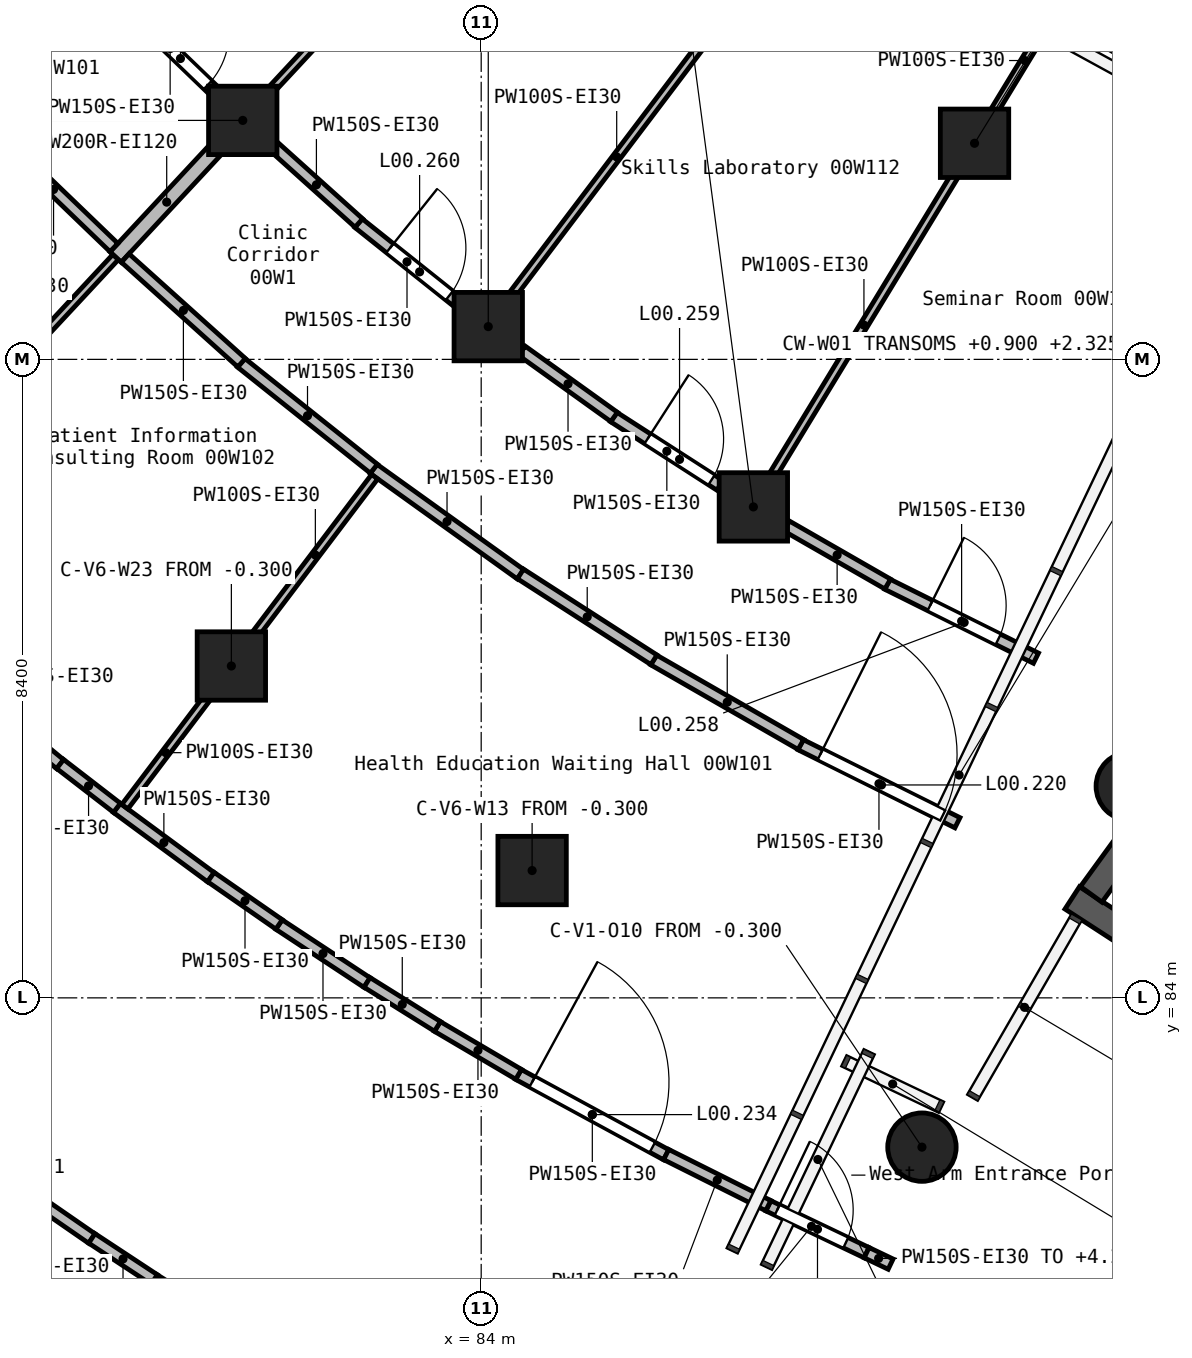
"""IFC4 building model, lengths in metres.
Left out: names, types, materials, properties, quantities, classifications, styles, units other than length and angle.
Written with IfcOpenShell. Run it as: python <this file> out.ifc"""

import sys

from ifc_helpers import new_model, si_unit, direction, frame, frame_2d, origin, origin_2d, place, context, subcontext, project, spatial, rectangle, circle, extrude, element, fill, save


model = new_model("IFC4")
c1 = context("Model", 3, precision=1e-05, world=origin(), true_north=direction((0.0, 1.0)))
c2 = subcontext(c1, "Body", "Model", "MODEL_VIEW")
j1 = project(units=[si_unit("LENGTHUNIT", "METRE"), si_unit("PLANEANGLEUNIT", "RADIAN")], contexts=[c1])
p1 = place(None, origin())
s1 = spatial("IfcSite", under=j1, at=p1, CompositionType="ELEMENT")
p2 = place(p1, origin())
s2 = spatial("IfcBuilding", under=s1, at=p2, CompositionType="ELEMENT")
p3 = place(p2, origin())
s3 = spatial("IfcBuildingStorey", under=s2, at=p3, CompositionType="ELEMENT", Elevation=0.0)
for number, where, z_axis, x_axis in (
    (1, (80.713, 88.366, -0.3), (0.0, 0.0, 1.0), (1.0, 0.0, 0.0)),
    (2, (80.863, 95.544, -0.3), (0.0, 0.0, 1.0), (1.0, 0.0, 0.0)),
    (3, (84.093, 92.831, -0.3), (0.0, 0.0, 1.0), (1.0, 0.0, 0.0)),
    (4, (84.67, 85.675, -0.3), (0.0, 0.0, 1.0), (1.0, 0.0, 0.0)),
    (5, (87.581, 90.459, -0.3), (0.0, 0.0, 1.0), (1.0, 0.0, 0.0)),
):
    element("IfcColumn", number, at=place(p3, frame(where, z_axis=z_axis, x_axis=x_axis)), inside=s3, PredefinedType="COLUMN", context=c2, shape_type="SweptSolid", body=[
        extrude(rectangle(XDim=0.9, YDim=0.9, at=origin_2d()), origin(), (0.0, 0.0, 1.0), 5.7),
    ])
p4 = place(p3, frame((89.799, 82.036, -0.3), z_axis=(0.0, 0.0, 1.0), x_axis=(1.0, 0.0, 0.0)))
e6 = element("IfcColumn", 6, at=p4, inside=s3, PredefinedType="COLUMN", context=c2, shape_type="SweptSolid", body=[
    extrude(circle(Radius=0.45, at=origin_2d()), origin(), (0.0, 0.0, 1.0), 5.7),
])
p5 = place(p3, frame((90.491, 95.243, -0.3), z_axis=(0.0, 0.0, 1.0), x_axis=(1.0, 0.0, 0.0)))
e7 = element("IfcColumn", 7, at=p5, inside=s3, PredefinedType="COLUMN", context=c2, shape_type="SweptSolid", body=[
    extrude(rectangle(XDim=0.9, YDim=0.9, at=origin_2d()), origin(), (0.0, 0.0, 1.0), 5.7),
])
p6 = place(p3, frame((92.54, 86.784, -0.3), z_axis=(0.0, 0.0, 1.0), x_axis=(1.0, 0.0, 0.0)))
e8 = element("IfcColumn", 8, at=p6, inside=s3, PredefinedType="COLUMN", context=c2, shape_type="SweptSolid", body=[
    extrude(circle(Radius=0.45, at=origin_2d()), origin(), (0.0, 0.0, 1.0), 5.7),
])
p7 = place(p3, frame((91.776, 85.315, -0.3), z_axis=(0.0, 0.0, 1.0), x_axis=(0.838710342359, -0.544577782893, 0.0)))
e9 = element("IfcWall", 9, at=p7, inside=s3, PredefinedType="SHEAR", context=c2, shape_type="SweptSolid", body=[
    extrude(rectangle(XDim=3.951, YDim=0.35, at=frame_2d((1.976, 0.0))), origin(), (0.0, 0.0, 1.0), 5.7),
])
p8 = place(p3, frame((93.187, 86.958, -0.3), z_axis=(0.0, 0.0, 1.0), x_axis=(-0.588083467619, -0.808800244259, 0.0)))
e10 = element("IfcWall", 10, at=p8, inside=s3, PredefinedType="SHEAR", context=c2, shape_type="SweptSolid", body=[
    extrude(rectangle(XDim=1.974, YDim=0.35, at=frame_2d((0.987, 0.0))), origin(), (0.0, 0.0, 1.0), 5.7),
])
p9 = place(p3, frame((79.19, 93.746, 0.0), z_axis=(0.0, 0.0, 1.0), x_axis=(0.681171780306, 0.732123627344, 0.0)))
e11 = element("IfcWall", 11, at=p9, inside=s3, PredefinedType="SOLIDWALL", context=c2, shape_type="SweptSolid", body=[
    extrude(rectangle(XDim=1.974, YDim=0.2, at=frame_2d((0.987, 0.0))), origin(), (0.0, 0.0, 1.0), 5.05),
])
p10 = place(p3, frame((88.201, 87.331, 0.0), z_axis=(0.0, 0.0, 1.0), x_axis=(0.895335597875, -0.445392149883, 0.0)))
e12 = element("IfcWall", 12, at=p10, inside=s3, PredefinedType="PARTITIONING", context=c2, shape_type="SweptSolid", body=[
    extrude(rectangle(XDim=2.307, YDim=0.15, at=frame_2d((1.153, 0.0))), origin(), (0.0, 0.0, 1.0), 5.05),
])
p11 = place(p10, frame((0.291, 0.0, 0.0)))
e13 = element("IfcOpeningElement", 13, at=p11, cuts=e12, PredefinedType="OPENING", context=c2, shape_type="SweptSolid", body=[
    extrude(rectangle(XDim=1.8, YDim=2.1, at=frame_2d((0.9, 1.05))), frame((0.0, 0.085, 0.0), z_axis=(0.0, -1.0, 0.0), x_axis=(1.0, 0.0, 0.0)), (0.0, 0.0, 1.0), 0.17),
])
p12 = place(p3, frame((82.583, 90.961, 0.0), z_axis=(0.0, 0.0, 1.0), x_axis=(0.812456963848, -0.583021167622, 0.0)))
e14 = element("IfcWall", 14, at=p12, inside=s3, PredefinedType="PARTITIONING", context=c2, shape_type="SweptSolid", body=[
    extrude(rectangle(XDim=2.381, YDim=0.15, at=frame_2d((1.191, 0.0))), origin(), (0.0, 0.0, 1.0), 5.05),
])
p13 = place(p3, frame((80.841, 92.356, 0.0), z_axis=(0.0, 0.0, 1.0), x_axis=(0.781561025488, -0.62382879337, 0.0)))
e15 = element("IfcWall", 15, at=p13, inside=s3, PredefinedType="PARTITIONING", context=c2, shape_type="SweptSolid", body=[
    extrude(rectangle(XDim=2.235, YDim=0.15, at=frame_2d((1.118, 0.0))), origin(), (0.0, 0.0, 1.0), 5.05),
])
p14 = place(p3, frame((77.579, 95.4, 0.0), z_axis=(0.0, 0.0, 1.0), x_axis=(0.720594722174, -0.693356507415, 0.0)))
e16 = element("IfcWall", 16, at=p14, inside=s3, PredefinedType="PARTITIONING", context=c2, shape_type="SweptSolid", body=[
    extrude(rectangle(XDim=2.205, YDim=0.15, at=frame_2d((1.103, 0.0))), origin(), (0.0, 0.0, 1.0), 5.05),
])
p15 = place(p3, frame((86.268, 88.446, 0.0), z_axis=(0.0, 0.0, 1.0), x_axis=(0.867212921502, -0.497937494852, 0.0)))
e17 = element("IfcWall", 17, at=p15, inside=s3, PredefinedType="PARTITIONING", context=c2, shape_type="SweptSolid", body=[
    extrude(rectangle(XDim=2.235, YDim=0.15, at=frame_2d((1.118, 0.0))), origin(), (0.0, 0.0, 1.0), 5.05),
])
p16 = place(p3, frame((79.316, 93.733, 0.0), z_axis=(0.0, 0.0, 1.0), x_axis=(0.74346507851, -0.668774758073, 0.0)))
e18 = element("IfcWall", 18, at=p16, inside=s3, PredefinedType="PARTITIONING", context=c2, shape_type="SweptSolid", body=[
    extrude(rectangle(XDim=2.059, YDim=0.15, at=frame_2d((1.03, 0.0))), origin(), (0.0, 0.0, 1.0), 5.05),
])
p17 = place(p3, frame((84.517, 89.577, 0.0), z_axis=(0.0, 0.0, 1.0), x_axis=(0.840935250807, -0.541135753717, 0.0)))
e19 = element("IfcWall", 19, at=p17, inside=s3, PredefinedType="PARTITIONING", context=c2, shape_type="SweptSolid", body=[
    extrude(rectangle(XDim=2.088, YDim=0.15, at=frame_2d((1.044, 0.0))), origin(), (0.0, 0.0, 1.0), 5.05),
])
p18 = place(p3, frame((82.385, 94.194, 0.0), z_axis=(0.0, 0.0, 1.0), x_axis=(0.781756052881, -0.623584375833, 0.0)))
e20 = element("IfcWall", 20, at=p18, inside=s3, PredefinedType="PARTITIONING", context=c2, shape_type="SweptSolid", body=[
    extrude(rectangle(XDim=1.636, YDim=0.15, at=frame_2d((0.818, 0.0))), origin(), (0.0, 0.0, 1.0), 5.05),
])
p19 = place(p18, frame((0.53, 0.0, 0.0)))
e21 = element("IfcOpeningElement", 21, at=p19, cuts=e20, PredefinedType="OPENING", context=c2, shape_type="SweptSolid", body=[
    extrude(rectangle(XDim=1.0, YDim=2.1, at=frame_2d((0.5, 1.05))), frame((0.0, 0.085, 0.0), z_axis=(0.0, -1.0, 0.0), x_axis=(1.0, 0.0, 0.0)), (0.0, 0.0, 1.0), 0.17),
])
p20 = place(p3, frame((89.343, 89.442, 0.0), z_axis=(0.0, 0.0, 1.0), x_axis=(0.895274815557, -0.445514314731, 0.0)))
e22 = element("IfcWall", 22, at=p20, inside=s3, PredefinedType="PARTITIONING", context=c2, shape_type="SweptSolid", body=[
    extrude(rectangle(XDim=2.185, YDim=0.15, at=frame_2d((1.092, 0.0))), origin(), (0.0, 0.0, 1.0), 5.05),
])
p21 = place(p20, frame((0.63, 0.0, 0.0)))
e23 = element("IfcOpeningElement", 23, at=p21, cuts=e22, PredefinedType="OPENING", context=c2, shape_type="SweptSolid", body=[
    extrude(rectangle(XDim=1.0, YDim=2.1, at=frame_2d((0.5, 1.05))), frame((0.0, 0.085, 0.0), z_axis=(0.0, -1.0, 0.0), x_axis=(1.0, 0.0, 0.0)), (0.0, 0.0, 1.0), 0.17),
])
p22 = place(p3, frame((85.744, 91.642, 0.0), z_axis=(0.0, 0.0, 1.0), x_axis=(0.840848932624, -0.54126987031, 0.0)))
e24 = element("IfcWall", 24, at=p22, inside=s3, PredefinedType="PARTITIONING", context=c2, shape_type="SweptSolid", body=[
    extrude(rectangle(XDim=1.662, YDim=0.15, at=frame_2d((0.831, 0.0))), origin(), (0.0, 0.0, 1.0), 5.05),
])
p23 = place(p22, frame((0.53, 0.0, 0.0)))
e25 = element("IfcOpeningElement", 25, at=p23, cuts=e24, PredefinedType="OPENING", context=c2, shape_type="SweptSolid", body=[
    extrude(rectangle(XDim=1.0, YDim=2.1, at=frame_2d((0.5, 1.05))), frame((0.0, 0.085, 0.0), z_axis=(0.0, -1.0, 0.0), x_axis=(1.0, 0.0, 0.0)), (0.0, 0.0, 1.0), 0.17),
])
p24 = place(p3, frame((79.301, 97.072, 0.0), z_axis=(0.0, 0.0, 1.0), x_axis=(0.720465115712, -0.69349118022, 0.0)))
e26 = element("IfcWall", 26, at=p24, inside=s3, PredefinedType="PARTITIONING", context=c2, shape_type="SweptSolid", body=[
    extrude(rectangle(XDim=1.684, YDim=0.15, at=frame_2d((0.842, 0.0))), origin(), (0.0, 0.0, 1.0), 5.05),
])
p25 = place(p24, frame((0.53, 0.0, 0.0)))
e27 = element("IfcOpeningElement", 27, at=p25, cuts=e26, PredefinedType="OPENING", context=c2, shape_type="SweptSolid", body=[
    extrude(rectangle(XDim=1.0, YDim=2.1, at=frame_2d((0.5, 1.05))), frame((0.0, 0.085, 0.0), z_axis=(0.0, -1.0, 0.0), x_axis=(1.0, 0.0, 0.0)), (0.0, 0.0, 1.0), 0.17),
])
p26 = place(p3, frame((84.536, 92.513, 0.0), z_axis=(0.0, 0.0, 1.0), x_axis=(0.81243891359, -0.583046320359, 0.0)))
e28 = element("IfcWall", 28, at=p26, inside=s3, PredefinedType="PARTITIONING", context=c2, shape_type="SweptSolid", body=[
    extrude(rectangle(XDim=1.493, YDim=0.15, at=frame_2d((0.747, 0.0))), origin(), (0.0, 0.0, 1.0), 5.05),
])
p27 = place(p3, frame((88.018, 90.208, 0.0), z_axis=(0.0, 0.0, 1.0), x_axis=(0.867174234795, -0.498004865947, 0.0)))
e29 = element("IfcWall", 29, at=p27, inside=s3, PredefinedType="PARTITIONING", context=c2, shape_type="SweptSolid", body=[
    extrude(rectangle(XDim=1.535, YDim=0.15, at=frame_2d((0.768, 0.0))), origin(), (0.0, 0.0, 1.0), 5.05),
])
p28 = place(p3, frame((81.273, 95.199, 0.0), z_axis=(0.0, 0.0, 1.0), x_axis=(0.743576936712, -0.668650386368, 0.0)))
e30 = element("IfcWall", 30, at=p28, inside=s3, PredefinedType="PARTITIONING", context=c2, shape_type="SweptSolid", body=[
    extrude(rectangle(XDim=1.502, YDim=0.15, at=frame_2d((0.751, 0.0))), origin(), (0.0, 0.0, 1.0), 5.05),
])
p29 = place(p3, frame((84.489, 82.993, 0.0), z_axis=(0.0, 0.0, 1.0), x_axis=(0.878602388498, -0.47755402095, 0.0)))
e31 = element("IfcWall", 31, at=p29, inside=s3, PredefinedType="PARTITIONING", context=c2, shape_type="SweptSolid", body=[
    extrude(rectangle(XDim=2.215, YDim=0.15, at=frame_2d((1.107, 0.0))), origin(), (0.0, 0.0, 1.0), 5.05),
])
p30 = place(p29, frame((0.207, 0.0, 0.0)))
e32 = element("IfcOpeningElement", 32, at=p30, cuts=e31, PredefinedType="OPENING", context=c2, shape_type="SweptSolid", body=[
    extrude(rectangle(XDim=1.8, YDim=2.1, at=frame_2d((0.9, 1.05))), frame((0.0, 0.085, 0.0), z_axis=(0.0, -1.0, 0.0), x_axis=(1.0, 0.0, 0.0)), (0.0, 0.0, 1.0), 0.17),
])
p31 = place(p3, frame((77.051, 88.236, 0.0), z_axis=(0.0, 0.0, 1.0), x_axis=(0.771517511576, -0.636208086502, 0.0)))
e33 = element("IfcWall", 33, at=p31, inside=s3, PredefinedType="PARTITIONING", context=c2, shape_type="SweptSolid", body=[
    extrude(rectangle(XDim=1.828, YDim=0.15, at=frame_2d((0.914, 0.0))), origin(), (0.0, 0.0, 1.0), 5.05),
])
p32 = place(p3, frame((87.778, 81.264, 0.0), z_axis=(0.0, 0.0, 1.0), x_axis=(0.902557824877, -0.430568662066, 0.0)))
e34 = element("IfcWall", 34, at=p32, inside=s3, PredefinedType="PARTITIONING", context=c2, shape_type="SweptSolid", body=[
    extrude(rectangle(XDim=1.432, YDim=0.15, at=frame_2d((0.716, 0.0))), origin(), (0.0, 0.0, 1.0), 5.05),
])
p33 = place(p32, frame((0.129, 0.0, 0.0)))
e35 = element("IfcOpeningElement", 35, at=p33, cuts=e34, PredefinedType="OPENING", context=c2, shape_type="SweptSolid", body=[
    extrude(rectangle(XDim=1.0, YDim=2.1, at=frame_2d((0.5, 1.05))), frame((0.0, 0.085, 0.0), z_axis=(0.0, -1.0, 0.0), x_axis=(1.0, 0.0, 0.0)), (0.0, 0.0, 1.0), 0.17),
])
p34 = place(p3, frame((89.071, 80.648, 0.0), z_axis=(0.0, 0.0, 1.0), x_axis=(0.902641205527, -0.43039383602, 0.0)))
e36 = element("IfcWall", 36, at=p34, inside=s3, PredefinedType="PARTITIONING", context=c2, shape_type="SweptSolid", body=[
    extrude(rectangle(XDim=0.35, YDim=0.15, at=frame_2d((0.175, 0.0))), origin(), (0.0, 0.0, 1.0), 4.28),
])
p35 = place(p3, frame((86.434, 81.938, 0.0), z_axis=(0.0, 0.0, 1.0), x_axis=(0.894297168166, -0.447473546717, 0.0)))
e37 = element("IfcWall", 37, at=p35, inside=s3, PredefinedType="PARTITIONING", context=c2, shape_type="SweptSolid", body=[
    extrude(rectangle(XDim=1.503, YDim=0.15, at=frame_2d((0.751, 0.0))), origin(), (0.0, 0.0, 1.0), 5.05),
])
p36 = place(p3, frame((79.206, 86.5, 0.0), z_axis=(0.0, 0.0, 1.0), x_axis=(0.804960127747, -0.593328907721, 0.0)))
e38 = element("IfcWall", 38, at=p36, inside=s3, PredefinedType="PARTITIONING", context=c2, shape_type="SweptSolid", body=[
    extrude(rectangle(XDim=1.539, YDim=0.15, at=frame_2d((0.77, 0.0))), origin(), (0.0, 0.0, 1.0), 5.05),
])
p37 = place(p3, frame((79.695, 80.295, 0.0), z_axis=(0.0, 0.0, 1.0), x_axis=(0.847541618724, -0.530728936964, 0.0)))
e39 = element("IfcWall", 39, at=p37, inside=s3, PredefinedType="PARTITIONING", context=c2, shape_type="SweptSolid", body=[
    extrude(rectangle(XDim=1.353, YDim=0.15, at=frame_2d((0.676, 0.0))), origin(), (0.0, 0.0, 1.0), 5.05),
])
p38 = place(p3, frame((77.653, 81.68, 0.0), z_axis=(0.0, 0.0, 1.0), x_axis=(0.822646640465, -0.568552992194, 0.0)))
e40 = element("IfcWall", 40, at=p38, inside=s3, PredefinedType="PARTITIONING", context=c2, shape_type="SweptSolid", body=[
    extrude(rectangle(XDim=1.488, YDim=0.15, at=frame_2d((0.744, 0.0))), origin(), (0.0, 0.0, 1.0), 5.05),
])
p39 = place(p3, frame((81.338, 84.965, 0.0), z_axis=(0.0, 0.0, 1.0), x_axis=(0.834958204617, -0.550313362134, 0.0)))
e41 = element("IfcWall", 41, at=p39, inside=s3, PredefinedType="PARTITIONING", context=c2, shape_type="SweptSolid", body=[
    extrude(rectangle(XDim=1.389, YDim=0.15, at=frame_2d((0.695, 0.0))), origin(), (0.0, 0.0, 1.0), 5.05),
])
p40 = place(p3, frame((83.422, 83.624, 0.0), z_axis=(0.0, 0.0, 1.0), x_axis=(0.861696583626, -0.507423883718, 0.0)))
e42 = element("IfcWall", 42, at=p40, inside=s3, PredefinedType="PARTITIONING", context=c2, shape_type="SweptSolid", body=[
    extrude(rectangle(XDim=1.242, YDim=0.15, at=frame_2d((0.621, 0.0))), origin(), (0.0, 0.0, 1.0), 5.05),
])
for number, where, z_axis, x_axis in (
    (43, (82.498, 84.203, 0.0), (0.0, 0.0, 1.0), (0.848, -0.529, 0.0)),
    (44, (80.444, 85.589, 0.0), (0.0, 0.0, 1.0), (0.821, -0.571, 0.0)),
):
    element("IfcWall", number, at=place(p3, frame(where, z_axis=z_axis, x_axis=x_axis)), inside=s3, PredefinedType="PARTITIONING", context=c2, shape_type="SweptSolid", body=[
        extrude(rectangle(XDim=1.093, YDim=0.15, at=frame_2d((0.546, 0.0))), origin(), (0.0, 0.0, 1.0), 5.05),
    ])
p41 = place(p3, frame((78.877, 80.836, 0.0), z_axis=(0.0, 0.0, 1.0), x_axis=(0.835209839134, -0.549931381733, 0.0)))
e45 = element("IfcWall", 45, at=p41, inside=s3, PredefinedType="PARTITIONING", context=c2, shape_type="SweptSolid", body=[
    extrude(rectangle(XDim=0.982, YDim=0.15, at=frame_2d((0.491, 0.0))), origin(), (0.0, 0.0, 1.0), 5.05),
])
p42 = place(p3, frame((78.46, 87.077, 0.0), z_axis=(0.0, 0.0, 1.0), x_axis=(0.791671493317, -0.610947008069, 0.0)))
e46 = element("IfcWall", 46, at=p42, inside=s3, PredefinedType="PARTITIONING", context=c2, shape_type="SweptSolid", body=[
    extrude(rectangle(XDim=0.944, YDim=0.15, at=frame_2d((0.472, 0.0))), origin(), (0.0, 0.0, 1.0), 5.05),
])
p43 = place(p3, frame((84.418, 93.26, 0.0), z_axis=(0.0, 0.0, 1.0), x_axis=(0.603501117064, 0.797362152163, 0.0)))
e47 = element("IfcWall", 47, at=p43, inside=s3, PredefinedType="PARTITIONING", context=c2, shape_type="SweptSolid", body=[
    extrude(rectangle(XDim=4.522, YDim=0.1, at=frame_2d((2.261, 0.0))), origin(), (0.0, 0.0, 1.0), 5.05),
])
p44 = place(p3, frame((87.84, 90.885, 0.0), z_axis=(0.0, 0.0, 1.0), x_axis=(0.519618801015, 0.854398210223, 0.0)))
e48 = element("IfcWall", 48, at=p44, inside=s3, PredefinedType="PARTITIONING", context=c2, shape_type="SweptSolid", body=[
    extrude(rectangle(XDim=4.603, YDim=0.1, at=frame_2d((2.302, 0.0))), origin(), (0.0, 0.0, 1.0), 5.05),
])
p45 = place(p3, frame((90.75, 95.668, 0.0), z_axis=(0.0, 0.0, 1.0), x_axis=(0.519552672181, 0.854438424247, 0.0)))
e49 = element("IfcWall", 49, at=p45, inside=s3, PredefinedType="PARTITIONING", context=c2, shape_type="SweptSolid", body=[
    extrude(rectangle(XDim=1.552, YDim=0.1, at=frame_2d((0.776, 0.0))), origin(), (0.0, 0.0, 1.0), 5.05),
])
p46 = place(p3, frame((81.227, 95.935, 0.0), z_axis=(0.0, 0.0, 1.0), x_axis=(0.681211440492, 0.732086725288, 0.0)))
e50 = element("IfcWall", 50, at=p46, inside=s3, PredefinedType="PARTITIONING", context=c2, shape_type="SweptSolid", body=[
    extrude(rectangle(XDim=4.53, YDim=0.1, at=frame_2d((2.265, 0.0))), origin(), (0.0, 0.0, 1.0), 5.05),
])
p47 = place(p3, frame((77.412, 91.835, 0.0), z_axis=(0.0, 0.0, 1.0), x_axis=(0.681147107729, 0.732146582067, 0.0)))
e51 = element("IfcWall", 51, at=p47, inside=s3, PredefinedType="PARTITIONING", context=c2, shape_type="SweptSolid", body=[
    extrude(rectangle(XDim=2.609, YDim=0.1, at=frame_2d((1.304, 0.0))), origin(), (0.0, 0.0, 1.0), 5.05),
])
p48 = place(p3, frame((79.312, 86.515, 0.0), z_axis=(0.0, 0.0, 1.0), x_axis=(0.603588624137, 0.797295912954, 0.0)))
e52 = element("IfcWall", 52, at=p48, inside=s3, PredefinedType="PARTITIONING", context=c2, shape_type="SweptSolid", body=[
    extrude(rectangle(XDim=1.782, YDim=0.1, at=frame_2d((0.891, 0.0))), origin(), (0.0, 0.0, 1.0), 5.05),
])
p49 = place(p3, frame((81.038, 88.796, 0.0), z_axis=(0.0, 0.0, 1.0), x_axis=(0.603561177332, 0.797316690668, 0.0)))
e53 = element("IfcWall", 53, at=p49, inside=s3, PredefinedType="PARTITIONING", context=c2, shape_type="SweptSolid", body=[
    extrude(rectangle(XDim=2.584, YDim=0.1, at=frame_2d((1.292, 0.0))), origin(), (0.0, 0.0, 1.0), 5.05),
])
p50 = place(p3, frame((91.572, 96.928, 0.0), z_axis=(0.0, 0.0, 1.0), x_axis=(0.867607434085, -0.497249776591, 0.0)))
e54 = element("IfcWall", 54, at=p50, inside=s3, PredefinedType="PARTITIONING", context=c2, shape_type="SweptSolid", body=[
    extrude(rectangle(XDim=1.751, YDim=0.1, at=frame_2d((0.875, 0.0))), origin(), (0.0, 0.0, 1.0), 5.05),
])
p51 = place(p11, origin())
e55 = element("IfcDoor", 55, at=p51, inside=s3, OperationType="DOUBLE_DOOR_SINGLE_SWING", PredefinedType="DOOR", context=c2, shape_type="SweptSolid", body=[
    extrude(rectangle(XDim=1.8, YDim=2.1, at=frame_2d((0.9, 1.05))), frame((0.0, 0.025, 0.0), z_axis=(0.0, -1.0, 0.0), x_axis=(1.0, 0.0, 0.0)), (0.0, 0.0, 1.0), 0.05),
])
fill(e13, e55)
p52 = place(p30, frame((1.8, 0.0, 0.0), z_axis=(0.0, 0.0, 1.0), x_axis=(-1.0, 0.0, 0.0)))
e56 = element("IfcDoor", 56, at=p52, inside=s3, OperationType="DOUBLE_DOOR_SINGLE_SWING", PredefinedType="DOOR", context=c2, shape_type="SweptSolid", body=[
    extrude(rectangle(XDim=1.8, YDim=2.1, at=frame_2d((0.9, 1.05))), frame((0.0, 0.025, 0.0), z_axis=(0.0, -1.0, 0.0), x_axis=(1.0, 0.0, 0.0)), (0.0, 0.0, 1.0), 0.05),
])
fill(e32, e56)
p53 = place(p21, origin())
e57 = element("IfcDoor", 57, at=p53, inside=s3, OperationType="SINGLE_SWING_RIGHT", PredefinedType="DOOR", context=c2, shape_type="SweptSolid", body=[
    extrude(rectangle(XDim=1.0, YDim=2.1, at=frame_2d((0.5, 1.05))), frame((0.0, 0.025, 0.0), z_axis=(0.0, -1.0, 0.0), x_axis=(1.0, 0.0, 0.0)), (0.0, 0.0, 1.0), 0.05),
])
fill(e23, e57)
p54 = place(p23, origin())
e58 = element("IfcDoor", 58, at=p54, inside=s3, OperationType="SINGLE_SWING_RIGHT", PredefinedType="DOOR", context=c2, shape_type="SweptSolid", body=[
    extrude(rectangle(XDim=1.0, YDim=2.1, at=frame_2d((0.5, 1.05))), frame((0.0, 0.025, 0.0), z_axis=(0.0, -1.0, 0.0), x_axis=(1.0, 0.0, 0.0)), (0.0, 0.0, 1.0), 0.05),
])
fill(e25, e58)
p55 = place(p19, origin())
e59 = element("IfcDoor", 59, at=p55, inside=s3, OperationType="SINGLE_SWING_RIGHT", PredefinedType="DOOR", context=c2, shape_type="SweptSolid", body=[
    extrude(rectangle(XDim=1.0, YDim=2.1, at=frame_2d((0.5, 1.05))), frame((0.0, 0.025, 0.0), z_axis=(0.0, -1.0, 0.0), x_axis=(1.0, 0.0, 0.0)), (0.0, 0.0, 1.0), 0.05),
])
fill(e21, e59)
p56 = place(p25, origin())
e60 = element("IfcDoor", 60, at=p56, inside=s3, OperationType="SINGLE_SWING_RIGHT", PredefinedType="DOOR", context=c2, shape_type="SweptSolid", body=[
    extrude(rectangle(XDim=1.0, YDim=2.1, at=frame_2d((0.5, 1.05))), frame((0.0, 0.025, 0.0), z_axis=(0.0, -1.0, 0.0), x_axis=(1.0, 0.0, 0.0)), (0.0, 0.0, 1.0), 0.05),
])
fill(e27, e60)
p57 = place(p33, origin())
e61 = element("IfcDoor", 61, at=p57, inside=s3, OperationType="SINGLE_SWING_LEFT", PredefinedType="DOOR", context=c2, shape_type="SweptSolid", body=[
    extrude(rectangle(XDim=1.0, YDim=2.1, at=frame_2d((0.5, 1.05))), frame((0.0, 0.025, 0.0), z_axis=(0.0, -1.0, 0.0), x_axis=(1.0, 0.0, 0.0)), (0.0, 0.0, 1.0), 0.05),
])
fill(e35, e61)
save(model, sys.argv[1])
